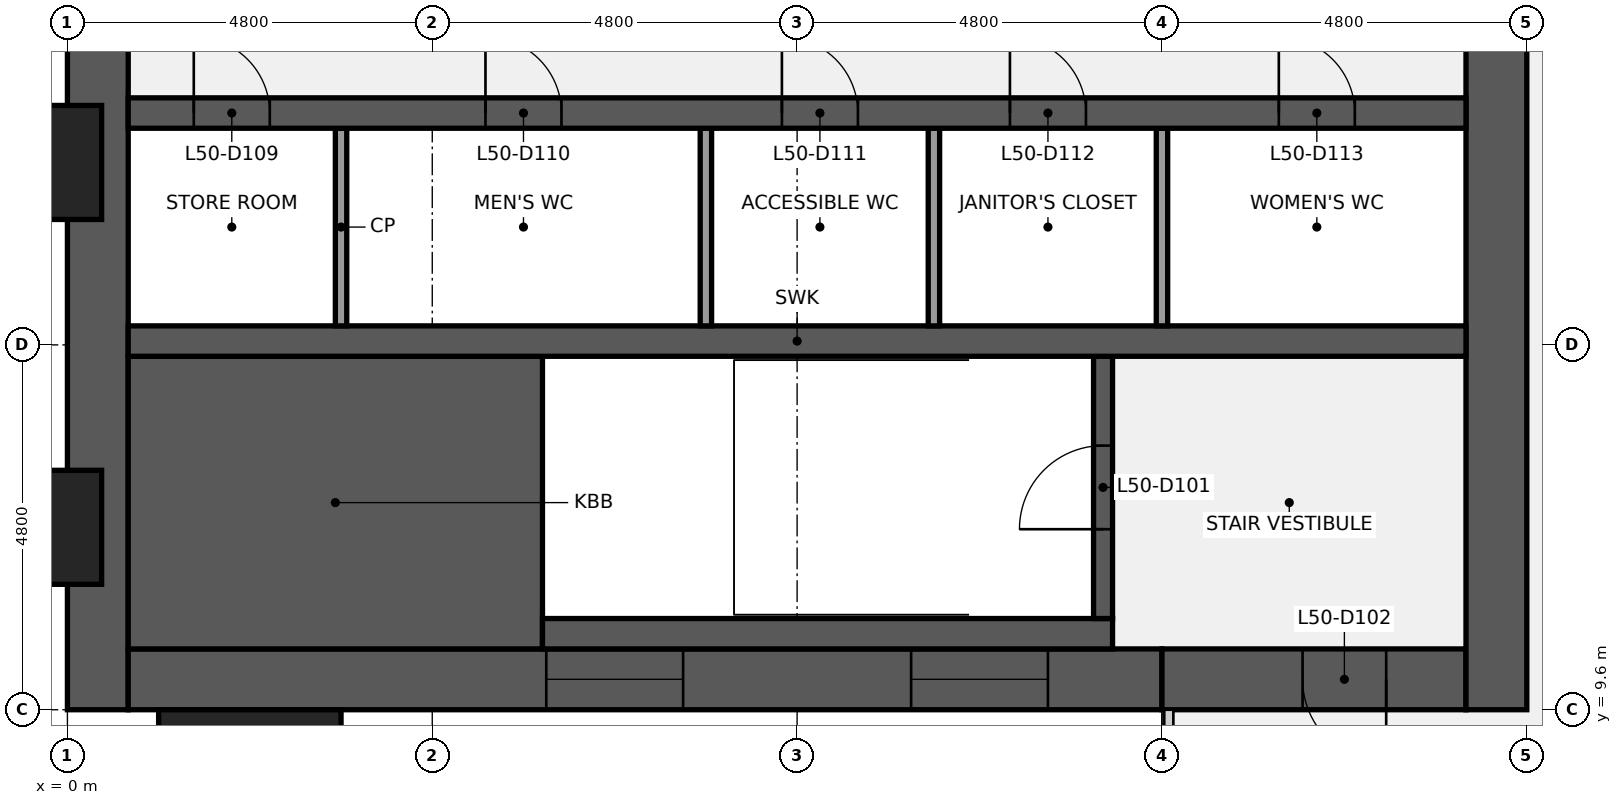
"""IFC4 building model, lengths in metres.
Left out: names, types, materials, properties, quantities, classifications, styles, units other than length and angle.
Written with IfcOpenShell. Run it as: python <this file> out.ifc"""

import sys

from ifc_helpers import new_model, si_unit, direction, frame, frame_2d, origin, origin_2d, place, context, subcontext, project, spatial, rectangle, extrude, element, fill, save


model = new_model("IFC4")
c1 = context("Model", 3, precision=1e-05, world=origin(), true_north=direction((0.0, 1.0)))
c2 = subcontext(c1, "Body", "Model", "MODEL_VIEW")
j1 = project(units=[si_unit("LENGTHUNIT", "METRE"), si_unit("PLANEANGLEUNIT", "RADIAN")], contexts=[c1])
p1 = place(None, origin())
s1 = spatial("IfcSite", under=j1, at=p1, CompositionType="ELEMENT")
p2 = place(p1, origin())
s2 = spatial("IfcBuilding", under=s1, at=p2, CompositionType="ELEMENT")
p3 = place(p2, frame((0.0, 0.0, 229.2)))
s3 = spatial("IfcBuildingStorey", under=s2, at=p3, CompositionType="ELEMENT", Elevation=229.2)
p4 = place(p3, frame((0.4, 9.6, 0.0), z_axis=(0.0, 0.0, 1.0), x_axis=(0.0, 1.0, 0.0)))
e1 = element("IfcWall", 1, at=p4, inside=s3, PredefinedType="SHEAR", context=c2, shape_type="SweptSolid", body=[
    extrude(rectangle(XDim=28.8, YDim=0.8, at=frame_2d((14.4, 0.0))), origin(), (0.0, 0.0, 1.0), 3.84),
])
p5 = place(p4, frame((8.85, 0.0, 0.9)))
e2 = element("IfcOpeningElement", 2, at=p5, cuts=e1, PredefinedType="OPENING", context=c2, shape_type="SweptSolid", body=[
    extrude(rectangle(XDim=1.5, YDim=1.5, at=frame_2d((0.75, 0.75))), frame((0.0, 0.41, 0.0), z_axis=(0.0, -1.0, 0.0), x_axis=(1.0, 0.0, 0.0)), (0.0, 0.0, 1.0), 0.82),
])
p6 = place(p4, frame((18.45, 0.0, 0.9)))
e3 = element("IfcOpeningElement", 3, at=p6, cuts=e1, PredefinedType="OPENING", context=c2, shape_type="SweptSolid", body=[
    extrude(rectangle(XDim=1.5, YDim=1.5, at=frame_2d((0.75, 0.75))), frame((0.0, 0.41, 0.0), z_axis=(0.0, -1.0, 0.0), x_axis=(1.0, 0.0, 0.0)), (0.0, 0.0, 1.0), 0.82),
])
p7 = place(p3, frame((14.4, 10.0, 0.0), z_axis=(0.0, 0.0, 1.0), x_axis=(-1.0, 0.0, 0.0)))
e4 = element("IfcWall", 4, at=p7, inside=s3, PredefinedType="SHEAR", context=c2, shape_type="SweptSolid", body=[
    extrude(rectangle(XDim=13.6, YDim=0.8, at=frame_2d((6.8, 0.0))), origin(), (0.0, 0.0, 1.0), 3.84),
])
p8 = place(p7, frame((6.3, 0.0, 0.9)))
e5 = element("IfcOpeningElement", 5, at=p8, cuts=e4, PredefinedType="OPENING", context=c2, shape_type="SweptSolid", body=[
    extrude(rectangle(XDim=1.8, YDim=1.5, at=frame_2d((0.9, 0.75))), frame((0.0, 0.41, 0.0), z_axis=(0.0, -1.0, 0.0), x_axis=(1.0, 0.0, 0.0)), (0.0, 0.0, 1.0), 0.82),
])
p9 = place(p7, frame((1.5, 0.0, 0.9)))
e6 = element("IfcOpeningElement", 6, at=p9, cuts=e4, PredefinedType="OPENING", context=c2, shape_type="SweptSolid", body=[
    extrude(rectangle(XDim=1.8, YDim=1.5, at=frame_2d((0.9, 0.75))), frame((0.0, 0.41, 0.0), z_axis=(0.0, -1.0, 0.0), x_axis=(1.0, 0.0, 0.0)), (0.0, 0.0, 1.0), 0.82),
])
p10 = place(p3, frame((18.4, 10.0, 0.0), z_axis=(0.0, 0.0, 1.0), x_axis=(-1.0, 0.0, 0.0)))
e7 = element("IfcWall", 7, at=p10, inside=s3, PredefinedType="SHEAR", context=c2, shape_type="SweptSolid", body=[
    extrude(rectangle(XDim=4.0, YDim=0.8, at=frame_2d((2.0, 0.0))), origin(), (0.0, 0.0, 1.0), 3.84),
])
p11 = place(p10, frame((1.05, 0.0, 0.0)))
e8 = element("IfcOpeningElement", 8, at=p11, cuts=e7, PredefinedType="OPENING", context=c2, shape_type="SweptSolid", body=[
    extrude(rectangle(XDim=1.1, YDim=2.1, at=frame_2d((0.55, 1.05))), frame((0.0, 0.41, 0.0), z_axis=(0.0, -1.0, 0.0), x_axis=(1.0, 0.0, 0.0)), (0.0, 0.0, 1.0), 0.82),
])
p12 = place(p3, frame((18.8, 38.4, 0.0), z_axis=(0.0, 0.0, 1.0), x_axis=(0.0, -1.0, 0.0)))
e9 = element("IfcWall", 9, at=p12, inside=s3, PredefinedType="SHEAR", context=c2, shape_type="SweptSolid", body=[
    extrude(rectangle(XDim=28.8, YDim=0.8, at=frame_2d((14.4, 0.0))), origin(), (0.0, 0.0, 1.0), 3.84),
])
p13 = place(p12, frame((18.3, 0.0, 0.0)))
e10 = element("IfcOpeningElement", 10, at=p13, cuts=e9, PredefinedType="OPENING", context=c2, shape_type="SweptSolid", body=[
    extrude(rectangle(XDim=1.8, YDim=2.1, at=frame_2d((0.9, 1.05))), frame((0.0, 0.41, 0.0), z_axis=(0.0, -1.0, 0.0), x_axis=(1.0, 0.0, 0.0)), (0.0, 0.0, 1.0), 0.82),
])
p14 = place(p12, frame((8.7, 0.0, 0.0)))
e11 = element("IfcOpeningElement", 11, at=p14, cuts=e9, PredefinedType="OPENING", context=c2, shape_type="SweptSolid", body=[
    extrude(rectangle(XDim=1.8, YDim=2.1, at=frame_2d((0.9, 1.05))), frame((0.0, 0.41, 0.0), z_axis=(0.0, -1.0, 0.0), x_axis=(1.0, 0.0, 0.0)), (0.0, 0.0, 1.0), 0.82),
])
p15 = place(p3, frame((0.8, 12.325, 0.0), z_axis=(0.0, 0.0, 1.0), x_axis=(1.0, 0.0, 0.0)))
e12 = element("IfcWall", 12, at=p15, inside=s3, PredefinedType="SHEAR", context=c2, shape_type="SweptSolid", body=[
    extrude(rectangle(XDim=5.45, YDim=3.85, at=frame_2d((2.725, 0.0))), origin(), (0.0, 0.0, 1.0), 3.84),
])
p16 = place(p3, frame((6.25, 10.6, 0.0), z_axis=(0.0, 0.0, 1.0), x_axis=(1.0, 0.0, 0.0)))
e13 = element("IfcWall", 13, at=p16, inside=s3, PredefinedType="SHEAR", context=c2, shape_type="SweptSolid", body=[
    extrude(rectangle(XDim=7.5, YDim=0.4, at=frame_2d((3.75, 0.0))), origin(), (0.0, 0.0, 1.0), 3.84),
])
p17 = place(p3, frame((13.625, 10.8, 0.0), z_axis=(0.0, 0.0, 1.0), x_axis=(0.0, 1.0, 0.0)))
e14 = element("IfcWall", 14, at=p17, inside=s3, PredefinedType="SHEAR", context=c2, shape_type="SweptSolid", body=[
    extrude(rectangle(XDim=3.45, YDim=0.25, at=frame_2d((1.725, 0.0))), origin(), (0.0, 0.0, 1.0), 3.84),
])
p18 = place(p17, frame((1.175, 0.0, 0.0)))
e15 = element("IfcOpeningElement", 15, at=p18, cuts=e14, PredefinedType="OPENING", context=c2, shape_type="SweptSolid", body=[
    extrude(rectangle(XDim=1.1, YDim=2.1, at=frame_2d((0.55, 1.05))), frame((0.0, 0.135, 0.0), z_axis=(0.0, -1.0, 0.0), x_axis=(1.0, 0.0, 0.0)), (0.0, 0.0, 1.0), 0.27),
])
p19 = place(p3, frame((0.8, 14.45, 0.0), z_axis=(0.0, 0.0, 1.0), x_axis=(1.0, 0.0, 0.0)))
e16 = element("IfcWall", 16, at=p19, inside=s3, PredefinedType="SHEAR", context=c2, shape_type="SweptSolid", body=[
    extrude(rectangle(XDim=17.6, YDim=0.4, at=frame_2d((8.8, 0.0))), origin(), (0.0, 0.0, 1.0), 3.84),
])
for number, where, z_axis, x_axis in (
    (17, (3.6, 14.65, 0.0), (0.0, 0.0, 1.0), (0.0, 1.0, 0.0)),
    (18, (8.4, 14.65, 0.0), (0.0, 0.0, 1.0), (0.0, 1.0, 0.0)),
    (19, (11.4, 14.65, 0.0), (0.0, 0.0, 1.0), (0.0, 1.0, 0.0)),
    (20, (14.4, 14.65, 0.0), (0.0, 0.0, 1.0), (0.0, 1.0, 0.0)),
):
    element("IfcWall", number, at=place(p3, frame(where, z_axis=z_axis, x_axis=x_axis)), inside=s3, PredefinedType="PARTITIONING", context=c2, shape_type="SweptSolid", body=[
        extrude(rectangle(XDim=2.6, YDim=0.15, at=frame_2d((1.3, 0.0))), origin(), (0.0, 0.0, 1.0), 3.84),
    ])
p20 = place(p3, frame((0.8, 17.45, 0.0), z_axis=(0.0, 0.0, 1.0), x_axis=(1.0, 0.0, 0.0)))
e21 = element("IfcWall", 21, at=p20, inside=s3, PredefinedType="SHEAR", context=c2, shape_type="SweptSolid", body=[
    extrude(rectangle(XDim=17.6, YDim=0.4, at=frame_2d((8.8, 0.0))), origin(), (0.0, 0.0, 1.0), 3.84),
])
p21 = place(p20, frame((0.863, 0.0, 0.0)))
e22 = element("IfcOpeningElement", 22, at=p21, cuts=e21, PredefinedType="OPENING", context=c2, shape_type="SweptSolid", body=[
    extrude(rectangle(XDim=1.0, YDim=2.1, at=frame_2d((0.5, 1.05))), frame((0.0, 0.21, 0.0), z_axis=(0.0, -1.0, 0.0), x_axis=(1.0, 0.0, 0.0)), (0.0, 0.0, 1.0), 0.42),
])
p22 = place(p20, frame((4.7, 0.0, 0.0)))
e23 = element("IfcOpeningElement", 23, at=p22, cuts=e21, PredefinedType="OPENING", context=c2, shape_type="SweptSolid", body=[
    extrude(rectangle(XDim=1.0, YDim=2.1, at=frame_2d((0.5, 1.05))), frame((0.0, 0.21, 0.0), z_axis=(0.0, -1.0, 0.0), x_axis=(1.0, 0.0, 0.0)), (0.0, 0.0, 1.0), 0.42),
])
p23 = place(p20, frame((8.6, 0.0, 0.0)))
e24 = element("IfcOpeningElement", 24, at=p23, cuts=e21, PredefinedType="OPENING", context=c2, shape_type="SweptSolid", body=[
    extrude(rectangle(XDim=1.0, YDim=2.1, at=frame_2d((0.5, 1.05))), frame((0.0, 0.21, 0.0), z_axis=(0.0, -1.0, 0.0), x_axis=(1.0, 0.0, 0.0)), (0.0, 0.0, 1.0), 0.42),
])
p24 = place(p20, frame((11.6, 0.0, 0.0)))
e25 = element("IfcOpeningElement", 25, at=p24, cuts=e21, PredefinedType="OPENING", context=c2, shape_type="SweptSolid", body=[
    extrude(rectangle(XDim=1.0, YDim=2.1, at=frame_2d((0.5, 1.05))), frame((0.0, 0.21, 0.0), z_axis=(0.0, -1.0, 0.0), x_axis=(1.0, 0.0, 0.0)), (0.0, 0.0, 1.0), 0.42),
])
p25 = place(p20, frame((15.137, 0.0, 0.0)))
e26 = element("IfcOpeningElement", 26, at=p25, cuts=e21, PredefinedType="OPENING", context=c2, shape_type="SweptSolid", body=[
    extrude(rectangle(XDim=1.0, YDim=2.1, at=frame_2d((0.5, 1.05))), frame((0.0, 0.21, 0.0), z_axis=(0.0, -1.0, 0.0), x_axis=(1.0, 0.0, 0.0)), (0.0, 0.0, 1.0), 0.42),
])
for number, where, z_axis, x_axis in (
    (27, (-0.75, 12.0, 0.0), (0.0, 0.0, 1.0), (0.0, 1.0, 0.0)),
    (28, (-0.75, 16.8, 0.0), (0.0, 0.0, 1.0), (0.0, 1.0, 0.0)),
    (29, (2.4, 8.85, 0.0), (0.0, 0.0, 1.0), (1.0, 0.0, 0.0)),
):
    element("IfcColumn", number, at=place(p3, frame(where, z_axis=z_axis, x_axis=x_axis)), inside=s3, PredefinedType="PILASTER", context=c2, shape_type="SweptSolid", body=[
        extrude(rectangle(XDim=2.4, YDim=1.5, at=origin_2d()), origin(), (0.0, 0.0, 1.0), 4.0),
    ])
p26 = place(p18, origin())
e30 = element("IfcDoor", 30, at=p26, inside=s3, OperationType="SINGLE_SWING_LEFT", PredefinedType="DOOR", context=c2, shape_type="SweptSolid", body=[
    extrude(rectangle(XDim=1.1, YDim=2.1, at=frame_2d((0.55, 1.05))), frame((0.0, 0.025, 0.0), z_axis=(0.0, -1.0, 0.0), x_axis=(1.0, 0.0, 0.0)), (0.0, 0.0, 1.0), 0.05),
])
fill(e15, e30)
p27 = place(p11, origin())
e31 = element("IfcDoor", 31, at=p27, inside=s3, OperationType="SINGLE_SWING_LEFT", PredefinedType="DOOR", context=c2, shape_type="SweptSolid", body=[
    extrude(rectangle(XDim=1.1, YDim=2.1, at=frame_2d((0.55, 1.05))), frame((0.0, 0.025, 0.0), z_axis=(0.0, -1.0, 0.0), x_axis=(1.0, 0.0, 0.0)), (0.0, 0.0, 1.0), 0.05),
])
fill(e8, e31)
p28 = place(p21, origin())
e32 = element("IfcDoor", 32, at=p28, inside=s3, OperationType="SINGLE_SWING_LEFT", PredefinedType="DOOR", context=c2, shape_type="SweptSolid", body=[
    extrude(rectangle(XDim=1.0, YDim=2.1, at=frame_2d((0.5, 1.05))), frame((0.0, 0.025, 0.0), z_axis=(0.0, -1.0, 0.0), x_axis=(1.0, 0.0, 0.0)), (0.0, 0.0, 1.0), 0.05),
])
fill(e22, e32)
p29 = place(p22, origin())
e33 = element("IfcDoor", 33, at=p29, inside=s3, OperationType="SINGLE_SWING_LEFT", PredefinedType="DOOR", context=c2, shape_type="SweptSolid", body=[
    extrude(rectangle(XDim=1.0, YDim=2.1, at=frame_2d((0.5, 1.05))), frame((0.0, 0.025, 0.0), z_axis=(0.0, -1.0, 0.0), x_axis=(1.0, 0.0, 0.0)), (0.0, 0.0, 1.0), 0.05),
])
fill(e23, e33)
p30 = place(p23, origin())
e34 = element("IfcDoor", 34, at=p30, inside=s3, OperationType="SINGLE_SWING_LEFT", PredefinedType="DOOR", context=c2, shape_type="SweptSolid", body=[
    extrude(rectangle(XDim=1.0, YDim=2.1, at=frame_2d((0.5, 1.05))), frame((0.0, 0.025, 0.0), z_axis=(0.0, -1.0, 0.0), x_axis=(1.0, 0.0, 0.0)), (0.0, 0.0, 1.0), 0.05),
])
fill(e24, e34)
p31 = place(p24, origin())
e35 = element("IfcDoor", 35, at=p31, inside=s3, OperationType="SINGLE_SWING_LEFT", PredefinedType="DOOR", context=c2, shape_type="SweptSolid", body=[
    extrude(rectangle(XDim=1.0, YDim=2.1, at=frame_2d((0.5, 1.05))), frame((0.0, 0.025, 0.0), z_axis=(0.0, -1.0, 0.0), x_axis=(1.0, 0.0, 0.0)), (0.0, 0.0, 1.0), 0.05),
])
fill(e25, e35)
p32 = place(p25, origin())
e36 = element("IfcDoor", 36, at=p32, inside=s3, OperationType="SINGLE_SWING_LEFT", PredefinedType="DOOR", context=c2, shape_type="SweptSolid", body=[
    extrude(rectangle(XDim=1.0, YDim=2.1, at=frame_2d((0.5, 1.05))), frame((0.0, 0.025, 0.0), z_axis=(0.0, -1.0, 0.0), x_axis=(1.0, 0.0, 0.0)), (0.0, 0.0, 1.0), 0.05),
])
fill(e26, e36)
p33 = place(p8, origin())
e37 = element("IfcWindow", 37, at=p33, inside=s3, PartitioningType="SINGLE_PANEL", PredefinedType="WINDOW", context=c2, shape_type="SweptSolid", body=[
    extrude(rectangle(XDim=1.8, YDim=1.5, at=frame_2d((0.9, 0.75))), frame((0.0, 0.03, 0.0), z_axis=(0.0, -1.0, 0.0), x_axis=(1.0, 0.0, 0.0)), (0.0, 0.0, 1.0), 0.06),
])
fill(e5, e37)
p34 = place(p9, origin())
e38 = element("IfcWindow", 38, at=p34, inside=s3, PartitioningType="SINGLE_PANEL", PredefinedType="WINDOW", context=c2, shape_type="SweptSolid", body=[
    extrude(rectangle(XDim=1.8, YDim=1.5, at=frame_2d((0.9, 0.75))), frame((0.0, 0.03, 0.0), z_axis=(0.0, -1.0, 0.0), x_axis=(1.0, 0.0, 0.0)), (0.0, 0.0, 1.0), 0.06),
])
fill(e6, e38)
save(model, sys.argv[1])
